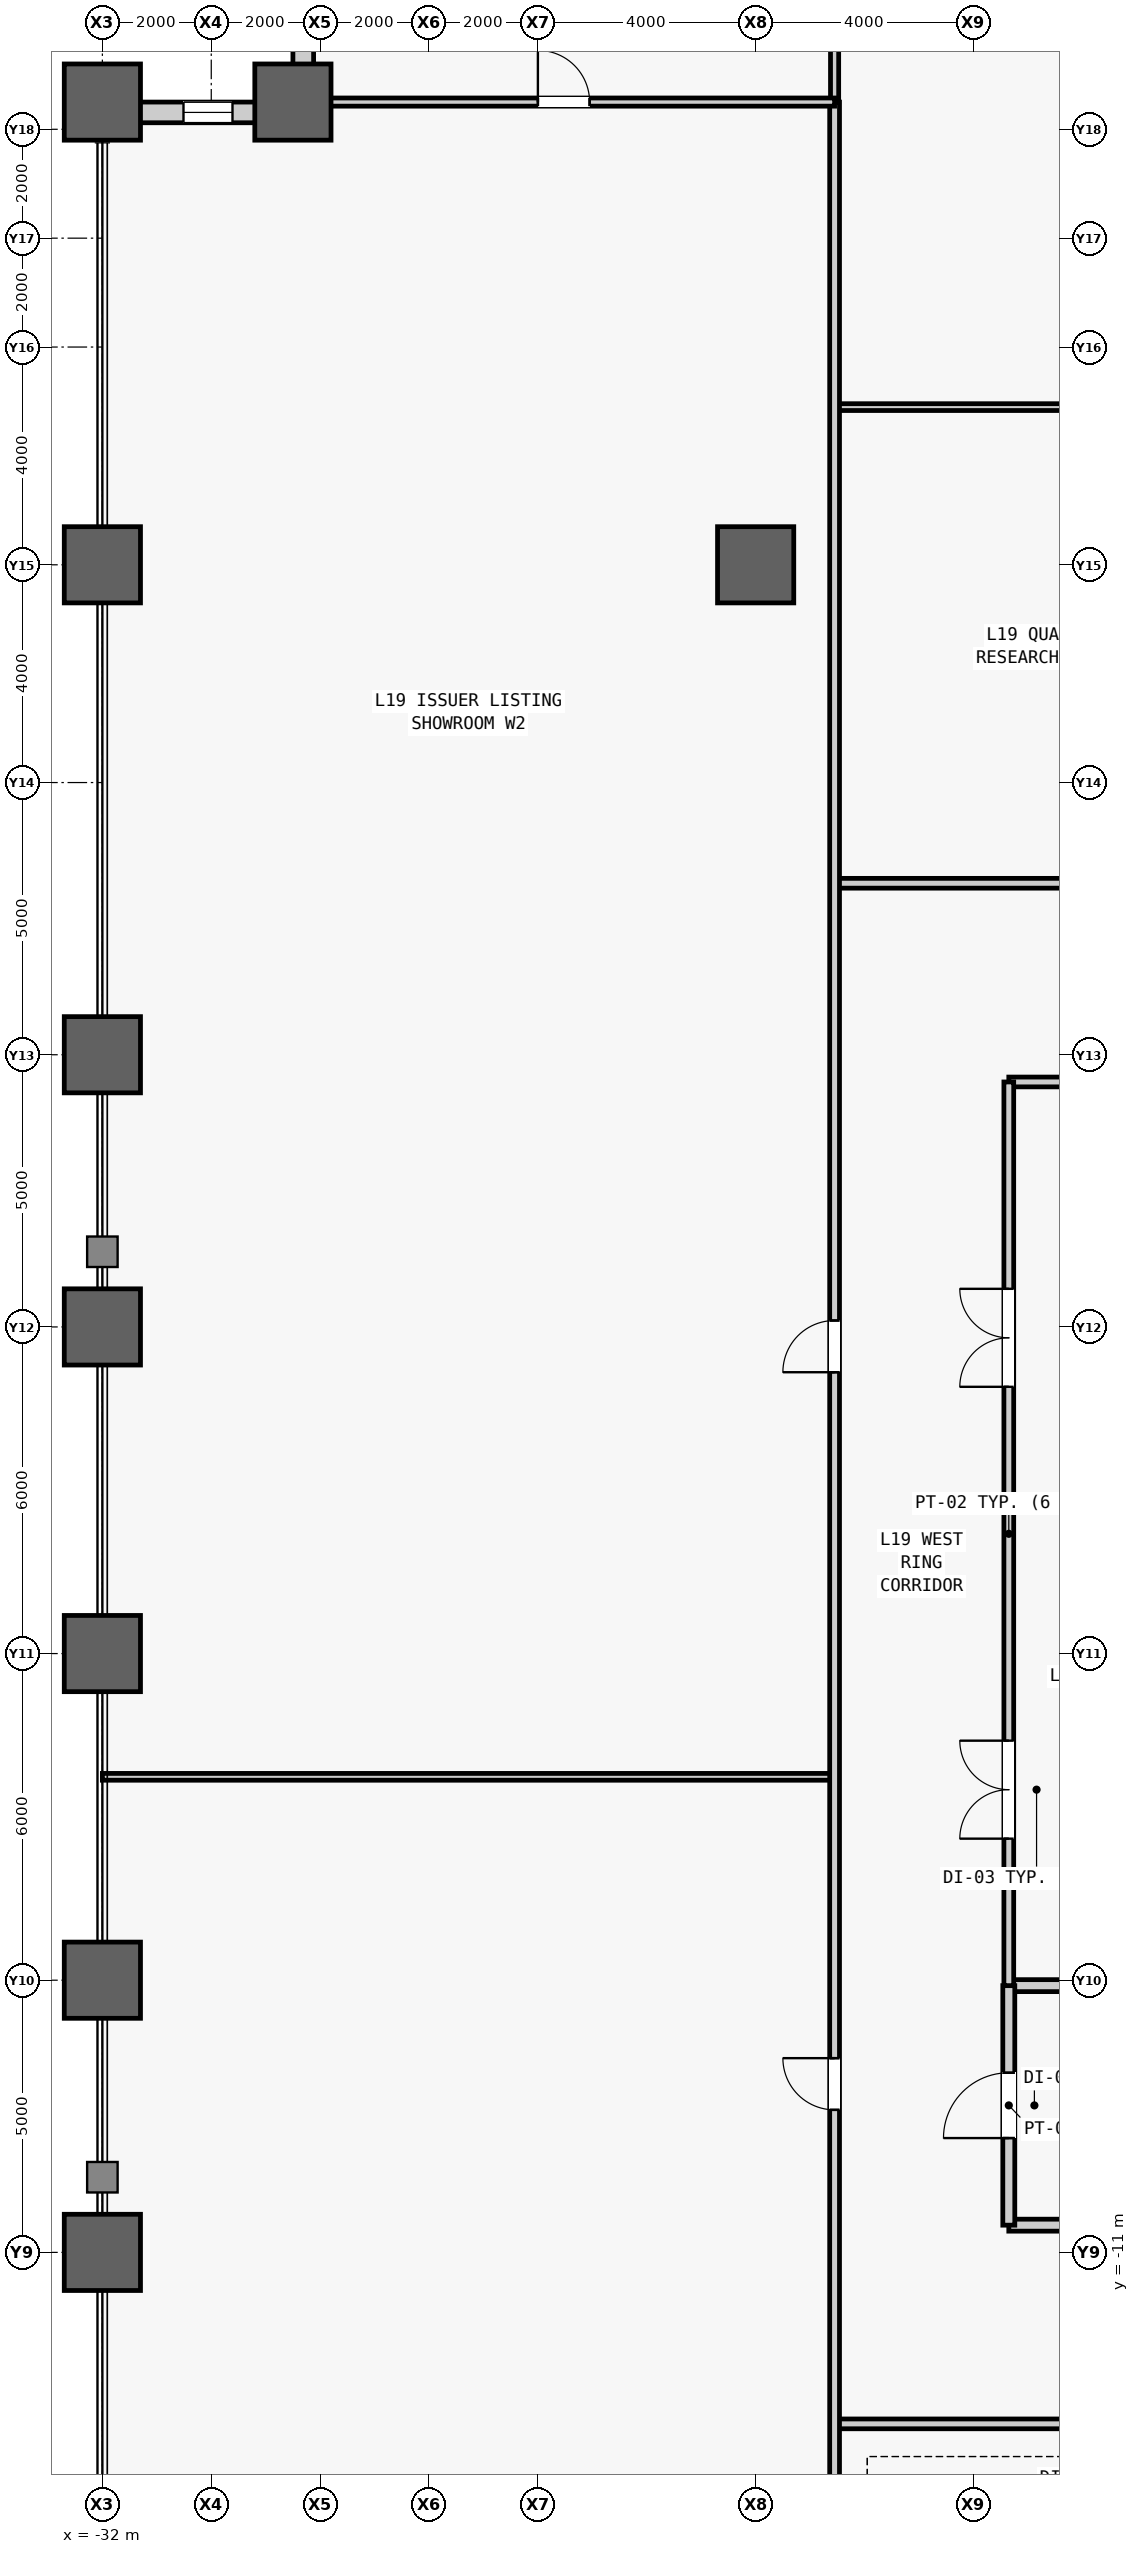
"""IFC4 building model, lengths in metres.
Left out: names, types, materials, properties, quantities, classifications, styles, units other than length and angle.
Written with IfcOpenShell. Run it as: python <this file> out.ifc"""

import sys

from ifc_helpers import new_model, si_unit, direction, frame, frame_2d, origin, origin_2d, place, context, subcontext, project, spatial, rectangle, hollow_rectangle, extrude, source, transform, mapped, element, fill, save


model = new_model("IFC4")
c1 = context("Model", 3, precision=1e-05, world=origin(), true_north=direction((0.0, 1.0)))
c2 = subcontext(c1, "Body", "Model", "MODEL_VIEW")
j1 = project(units=[si_unit("LENGTHUNIT", "METRE"), si_unit("PLANEANGLEUNIT", "RADIAN")], contexts=[c1])
p1 = place(None, origin())
s1 = spatial("IfcSite", under=j1, at=p1, CompositionType="ELEMENT")
p2 = place(p1, origin())
s2 = spatial("IfcBuilding", under=s1, at=p2, CompositionType="ELEMENT")
p3 = place(p2, frame((0.0, 0.0, 87.2)))
s3 = spatial("IfcBuildingStorey", under=s2, at=p3, CompositionType="ELEMENT", Elevation=87.2)
m1 = source(origin(), c2, "Body", "SweptSolid", [
    extrude(hollow_rectangle(XDim=1.4, YDim=1.4, WallThickness=0.075, at=origin_2d()), origin(), (0.0, 0.0, 1.0), 4.2),
])
for number, where, z_axis, x_axis in (
    (1, (-32.0, -11.0, 0.0), (0.0, 0.0, 1.0), (1.0, 0.0, 0.0)),
    (2, (-32.0, -6.0, 0.0), (0.0, 0.0, 1.0), (1.0, 0.0, 0.0)),
    (3, (-32.0, 0.0, 0.0), (0.0, 0.0, 1.0), (1.0, 0.0, 0.0)),
    (4, (-32.0, 6.0, 0.0), (0.0, 0.0, 1.0), (1.0, 0.0, 0.0)),
    (5, (-32.0, 11.0, 0.0), (0.0, 0.0, 1.0), (1.0, 0.0, 0.0)),
    (6, (-32.0, 20.0, 0.0), (0.0, 0.0, 1.0), (1.0, 0.0, 0.0)),
    (7, (-32.0, 28.5, 0.0), (0.0, 0.0, 1.0), (1.0, 0.0, 0.0)),
    (8, (-28.5, 28.5, 0.0), (0.0, 0.0, 1.0), (1.0, 0.0, 0.0)),
    (9, (-20.0, 20.0, 0.0), (0.0, 0.0, 1.0), (1.0, 0.0, 0.0)),
):
    element("IfcColumn", number, at=place(p3, frame(where, z_axis=z_axis, x_axis=x_axis)), inside=s3, PredefinedType="COLUMN", context=c2, shape_type="MappedRepresentation", body=[
        mapped(m1, transform((0.0, 0.0, 0.0), scale=1.0)),
    ])
m2 = source(origin(), c2, "Body", "SweptSolid", [
    extrude(rectangle(XDim=3.12, YDim=0.38, at=frame_2d((1.56, 0.0))), origin(), (0.0, 0.0, 1.0), 2.54),
])
p4 = place(p3, frame((-28.31, 28.5, 0.0), z_axis=(0.0, 0.0, 1.0), x_axis=(0.0, 1.0, 0.0)))
e10 = element("IfcWall", 10, at=p4, inside=s3, PredefinedType="STANDARD", context=c2, shape_type="MappedRepresentation", body=[
    mapped(m2, transform((0.0, 0.0, 0.0), scale=1.0)),
])
m3 = source(origin(), c2, "Body", "SweptSolid", [
    extrude(rectangle(XDim=0.9, YDim=1.82, at=frame_2d((0.45, 0.91))), frame((0.0, 0.2, 0.0), z_axis=(0.0, -1.0, 0.0), x_axis=(1.0, 0.0, 0.0)), (0.0, 0.0, 1.0), 0.4),
])
p5 = place(p4, frame((1.11, 0.0, 0.5)))
e11 = element("IfcOpeningElement", 11, at=p5, cuts=e10, PredefinedType="OPENING", context=c2, shape_type="MappedRepresentation", body=[
    mapped(m3, transform((0.0, 0.0, 0.0), scale=1.0)),
])
m4 = source(origin(), c2, "Body", "SweptSolid", [
    extrude(rectangle(XDim=3.12, YDim=0.38, at=frame_2d((1.56, 0.0))), origin(), (0.0, 0.0, 1.0), 3.245),
])
p6 = place(p3, frame((-28.5, 28.31, 0.0), z_axis=(0.0, 0.0, 1.0), x_axis=(-1.0, 0.0, 0.0)))
e12 = element("IfcWall", 12, at=p6, inside=s3, PredefinedType="STANDARD", context=c2, shape_type="MappedRepresentation", body=[
    mapped(m4, transform((0.0, 0.0, 0.0), scale=1.0)),
])
m5 = source(origin(), c2, "Body", "SweptSolid", [
    extrude(rectangle(XDim=0.9, YDim=2.4, at=frame_2d((0.45, 1.2))), frame((0.0, 0.2, 0.0), z_axis=(0.0, -1.0, 0.0), x_axis=(1.0, 0.0, 0.0)), (0.0, 0.0, 1.0), 0.4),
])
p7 = place(p6, frame((1.11, 0.0, 0.5)))
e13 = element("IfcOpeningElement", 13, at=p7, cuts=e12, PredefinedType="OPENING", context=c2, shape_type="MappedRepresentation", body=[
    mapped(m5, transform((0.0, 0.0, 0.0), scale=1.0)),
])
m6 = source(origin(), c2, "Body", "SweptSolid", [
    extrude(rectangle(XDim=4.05, YDim=0.22, at=frame_2d((2.025, 0.0))), origin(), (0.0, 0.0, 1.0), 3.94),
])
p8 = place(p3, frame((-15.35, -10.5, 0.0), z_axis=(0.0, 0.0, 1.0), x_axis=(1.0, 0.0, 0.0)))
e14 = element("IfcWall", 14, at=p8, inside=s3, PredefinedType="PARTITIONING", context=c2, shape_type="MappedRepresentation", body=[
    mapped(m6, transform((0.0, 0.0, 0.0), scale=1.0)),
])
m7 = source(origin(), c2, "Body", "SweptSolid", [
    extrude(rectangle(XDim=4.05, YDim=0.22, at=frame_2d((2.025, 0.0))), origin(), (0.0, 0.0, 1.0), 2.54),
])
p9 = place(p3, frame((-15.35, -6.1, 0.0), z_axis=(0.0, 0.0, 1.0), x_axis=(1.0, 0.0, 0.0)))
e15 = element("IfcWall", 15, at=p9, inside=s3, PredefinedType="PARTITIONING", context=c2, shape_type="MappedRepresentation", body=[
    mapped(m7, transform((0.0, 0.0, 0.0), scale=1.0)),
])
m8 = source(origin(), c2, "Body", "SweptSolid", [
    extrude(rectangle(XDim=4.4, YDim=0.22, at=frame_2d((2.2, 0.0))), origin(), (0.0, 0.0, 1.0), 3.94),
])
p10 = place(p3, frame((-15.35, -10.5, 0.0), z_axis=(0.0, 0.0, 1.0), x_axis=(0.0, 1.0, 0.0)))
e16 = element("IfcWall", 16, at=p10, inside=s3, PredefinedType="PARTITIONING", context=c2, shape_type="MappedRepresentation", body=[
    mapped(m8, transform((0.0, 0.0, 0.0), scale=1.0)),
])
m9 = source(origin(), c2, "Body", "SweptSolid", [
    extrude(rectangle(XDim=1.2, YDim=2.2, at=frame_2d((0.6, 1.1))), frame((0.0, 0.12, 0.0), z_axis=(0.0, -1.0, 0.0), x_axis=(1.0, 0.0, 0.0)), (0.0, 0.0, 1.0), 0.24),
])
p11 = place(p10, frame((1.6, 0.0, 0.0)))
e17 = element("IfcOpeningElement", 17, at=p11, cuts=e16, PredefinedType="OPENING", context=c2, shape_type="MappedRepresentation", body=[
    mapped(m9, transform((0.0, 0.0, 0.0), scale=1.0)),
])
m10 = source(origin(), c2, "Body", "SweptSolid", [
    extrude(rectangle(XDim=4.05, YDim=0.18, at=frame_2d((2.025, 0.0))), origin(), (0.0, 0.0, 1.0), 3.94),
])
p12 = place(p3, frame((-15.35, 10.5, 0.0), z_axis=(0.0, 0.0, 1.0), x_axis=(1.0, 0.0, 0.0)))
e18 = element("IfcWall", 18, at=p12, inside=s3, PredefinedType="PARTITIONING", context=c2, shape_type="MappedRepresentation", body=[
    mapped(m10, transform((0.0, 0.0, 0.0), scale=1.0)),
])
m11 = source(origin(), c2, "Body", "SweptSolid", [
    extrude(rectangle(XDim=16.6, YDim=0.18, at=frame_2d((8.3, 0.0))), origin(), (0.0, 0.0, 1.0), 3.94),
])
p13 = place(p3, frame((-15.35, -6.1, 0.0), z_axis=(0.0, 0.0, 1.0), x_axis=(0.0, 1.0, 0.0)))
e19 = element("IfcWall", 19, at=p13, inside=s3, PredefinedType="PARTITIONING", context=c2, shape_type="MappedRepresentation", body=[
    mapped(m11, transform((0.0, 0.0, 0.0), scale=1.0)),
])
m12 = source(origin(), c2, "Body", "SweptSolid", [
    extrude(rectangle(XDim=1.8, YDim=2.25, at=frame_2d((0.9, 1.125))), frame((0.0, 0.1, 0.0), z_axis=(0.0, -1.0, 0.0), x_axis=(1.0, 0.0, 0.0)), (0.0, 0.0, 1.0), 0.2),
])
p14 = place(p13, frame((2.7, 0.0, 0.0)))
e20 = element("IfcOpeningElement", 20, at=p14, cuts=e19, PredefinedType="OPENING", context=c2, shape_type="MappedRepresentation", body=[
    mapped(m12, transform((0.0, 0.0, 0.0), scale=1.0)),
])
p15 = place(p13, frame((11.0, 0.0, 0.0)))
e21 = element("IfcOpeningElement", 21, at=p15, cuts=e19, PredefinedType="OPENING", context=c2, shape_type="MappedRepresentation", body=[
    mapped(m12, transform((0.0, 0.0, 0.0), scale=1.0)),
])
m13 = source(origin(), c2, "Body", "SweptSolid", [
    extrude(rectangle(XDim=37.95, YDim=0.18, at=frame_2d((18.975, 0.0))), origin(), (0.0, 0.0, 1.0), 3.94),
])
p16 = place(p3, frame((-18.55, -14.15, 0.0), z_axis=(0.0, 0.0, 1.0), x_axis=(1.0, 0.0, 0.0)))
e22 = element("IfcWall", 22, at=p16, inside=s3, PredefinedType="PARTITIONING", context=c2, shape_type="MappedRepresentation", body=[
    mapped(m13, transform((0.0, 0.0, 0.0), scale=1.0)),
])
m14 = source(origin(), c2, "Body", "SweptSolid", [
    extrude(rectangle(XDim=1.05, YDim=2.2, at=frame_2d((0.525, 1.1))), frame((0.0, 0.1, 0.0), z_axis=(0.0, -1.0, 0.0), x_axis=(1.0, 0.0, 0.0)), (0.0, 0.0, 1.0), 0.2),
])
p17 = place(p16, frame((4.966, 0.0, 0.0)))
e23 = element("IfcOpeningElement", 23, at=p17, cuts=e22, PredefinedType="OPENING", context=c2, shape_type="MappedRepresentation", body=[
    mapped(m14, transform((0.0, 0.0, 0.0), scale=1.0)),
])
p18 = place(p16, frame((10.291, 0.0, 0.0)))
e24 = element("IfcOpeningElement", 24, at=p18, cuts=e22, PredefinedType="OPENING", context=c2, shape_type="MappedRepresentation", body=[
    mapped(m14, transform((0.0, 0.0, 0.0), scale=1.0)),
])
p19 = place(p16, frame((18.64, 0.0, 0.0)))
e25 = element("IfcOpeningElement", 25, at=p19, cuts=e22, PredefinedType="OPENING", context=c2, shape_type="MappedRepresentation", body=[
    mapped(m14, transform((0.0, 0.0, 0.0), scale=1.0)),
])
p20 = place(p16, frame((27.178, 0.0, 0.0)))
e26 = element("IfcOpeningElement", 26, at=p20, cuts=e22, PredefinedType="OPENING", context=c2, shape_type="MappedRepresentation", body=[
    mapped(m14, transform((0.0, 0.0, 0.0), scale=1.0)),
])
m15 = source(origin(), c2, "Body", "SweptSolid", [
    extrude(rectangle(XDim=11.385, YDim=0.125, at=frame_2d((5.692, 0.0))), origin(), (0.0, 0.0, 1.0), 3.94),
])
p21 = place(p3, frame((-18.55, 22.896, 0.0), z_axis=(0.0, 0.0, 1.0), x_axis=(1.0, 0.0, 0.0)))
e27 = element("IfcWall", 27, at=p21, inside=s3, PredefinedType="PARTITIONING", context=c2, shape_type="MappedRepresentation", body=[
    mapped(m15, transform((0.0, 0.0, 0.0), scale=1.0)),
])
m16 = source(origin(), c2, "Body", "SweptSolid", [
    extrude(rectangle(XDim=0.95, YDim=2.15, at=frame_2d((0.475, 1.075))), frame((0.0, 0.073, 0.0), z_axis=(0.0, -1.0, 0.0), x_axis=(1.0, 0.0, 0.0)), (0.0, 0.0, 1.0), 0.145),
])
p22 = place(p21, frame((5.218, 0.0, 0.0)))
e28 = element("IfcOpeningElement", 28, at=p22, cuts=e27, PredefinedType="OPENING", context=c2, shape_type="MappedRepresentation", body=[
    mapped(m16, transform((0.0, 0.0, 0.0), scale=1.0)),
])
p23 = place(p3, frame((-18.55, 14.15, 0.0), z_axis=(0.0, 0.0, 1.0), x_axis=(1.0, 0.0, 0.0)))
e29 = element("IfcWall", 29, at=p23, inside=s3, PredefinedType="PARTITIONING", context=c2, shape_type="MappedRepresentation", body=[
    mapped(m13, transform((0.0, 0.0, 0.0), scale=1.0)),
])
p24 = place(p23, frame((7.242, 0.0, 0.0)))
e30 = element("IfcOpeningElement", 30, at=p24, cuts=e29, PredefinedType="OPENING", context=c2, shape_type="MappedRepresentation", body=[
    mapped(m14, transform((0.0, 0.0, 0.0), scale=1.0)),
])
p25 = place(p23, frame((17.691, 0.0, 0.0)))
e31 = element("IfcOpeningElement", 31, at=p25, cuts=e29, PredefinedType="OPENING", context=c2, shape_type="MappedRepresentation", body=[
    mapped(m14, transform((0.0, 0.0, 0.0), scale=1.0)),
])
p26 = place(p23, frame((28.473, 0.0, 0.0)))
e32 = element("IfcOpeningElement", 32, at=p26, cuts=e29, PredefinedType="OPENING", context=c2, shape_type="MappedRepresentation", body=[
    mapped(m14, transform((0.0, 0.0, 0.0), scale=1.0)),
])
m17 = source(origin(), c2, "Body", "SweptSolid", [
    extrude(rectangle(XDim=3.5, YDim=0.15, at=frame_2d((1.75, 0.0))), origin(), (0.0, 0.0, 1.0), 3.94),
])
p27 = place(p3, frame((-18.55, 28.5, 0.0), z_axis=(0.0, 0.0, 1.0), x_axis=(0.0, 1.0, 0.0)))
e33 = element("IfcWall", 33, at=p27, inside=s3, PredefinedType="PARTITIONING", context=c2, shape_type="MappedRepresentation", body=[
    mapped(m17, transform((0.0, 0.0, 0.0), scale=1.0)),
])
m18 = source(origin(), c2, "Body", "SweptSolid", [
    extrude(rectangle(XDim=13.45, YDim=0.125, at=frame_2d((6.725, 0.0))), origin(), (0.0, 0.0, 1.0), 3.94),
])
p28 = place(p3, frame((-32.0, -2.264, 0.0), z_axis=(0.0, 0.0, 1.0), x_axis=(1.0, 0.0, 0.0)))
e34 = element("IfcWall", 34, at=p28, inside=s3, PredefinedType="PARTITIONING", context=c2, shape_type="MappedRepresentation", body=[
    mapped(m18, transform((0.0, 0.0, 0.0), scale=1.0)),
])
m19 = source(origin(), c2, "Body", "SweptSolid", [
    extrude(rectangle(XDim=57.0, YDim=0.18, at=frame_2d((28.5, 0.0))), origin(), (0.0, 0.0, 1.0), 3.94),
])
p29 = place(p3, frame((-18.55, -28.5, 0.0), z_axis=(0.0, 0.0, 1.0), x_axis=(0.0, 1.0, 0.0)))
e35 = element("IfcWall", 35, at=p29, inside=s3, PredefinedType="PARTITIONING", context=c2, shape_type="MappedRepresentation", body=[
    mapped(m19, transform((0.0, 0.0, 0.0), scale=1.0)),
])
m20 = source(origin(), c2, "Body", "SweptSolid", [
    extrude(rectangle(XDim=0.95, YDim=2.15, at=frame_2d((0.475, 1.075))), frame((0.0, 0.1, 0.0), z_axis=(0.0, -1.0, 0.0), x_axis=(1.0, 0.0, 0.0)), (0.0, 0.0, 1.0), 0.2),
])
p30 = place(p29, frame((20.118, 0.0, 0.0)))
e36 = element("IfcOpeningElement", 36, at=p30, cuts=e35, PredefinedType="OPENING", context=c2, shape_type="MappedRepresentation", body=[
    mapped(m20, transform((0.0, 0.0, 0.0), scale=1.0)),
])
p31 = place(p29, frame((33.668, 0.0, 0.0)))
e37 = element("IfcOpeningElement", 37, at=p31, cuts=e35, PredefinedType="OPENING", context=c2, shape_type="MappedRepresentation", body=[
    mapped(m20, transform((0.0, 0.0, 0.0), scale=1.0)),
])
m21 = source(origin(), c2, "Body", "SweptSolid", [
    extrude(rectangle(XDim=9.95, YDim=0.15, at=frame_2d((4.975, 0.0))), origin(), (0.0, 0.0, 1.0), 3.94),
])
p32 = place(p3, frame((-28.5, 28.5, 0.0), z_axis=(0.0, 0.0, 1.0), x_axis=(1.0, 0.0, 0.0)))
e38 = element("IfcWall", 38, at=p32, inside=s3, PredefinedType="PARTITIONING", context=c2, shape_type="MappedRepresentation", body=[
    mapped(m21, transform((0.0, 0.0, 0.0), scale=1.0)),
])
m22 = source(origin(), c2, "Body", "SweptSolid", [
    extrude(rectangle(XDim=0.95, YDim=2.15, at=frame_2d((0.475, 1.075))), frame((0.0, 0.085, 0.0), z_axis=(0.0, -1.0, 0.0), x_axis=(1.0, 0.0, 0.0)), (0.0, 0.0, 1.0), 0.17),
])
p33 = place(p32, frame((4.5, 0.0, 0.0)))
e39 = element("IfcOpeningElement", 39, at=p33, cuts=e38, PredefinedType="OPENING", context=c2, shape_type="MappedRepresentation", body=[
    mapped(m22, transform((0.0, 0.0, 0.0), scale=1.0)),
])
m23 = source(origin(), c2, "Body", "SweptSolid", [
    extrude(rectangle(XDim=0.9, YDim=2.4, at=frame_2d((0.45, 1.2))), frame((0.0, 0.03, 0.0), z_axis=(0.0, -1.0, 0.0), x_axis=(1.0, 0.0, 0.0)), (0.0, 0.0, 1.0), 0.06),
])
p34 = place(p7, origin())
e40 = element("IfcWindow", 40, at=p34, inside=s3, PartitioningType="SINGLE_PANEL", PredefinedType="WINDOW", context=c2, shape_type="MappedRepresentation", body=[
    mapped(m23, transform((0.0, 0.0, 0.0), scale=1.0)),
])
fill(e13, e40)
m24 = source(origin(), c2, "Body", "SweptSolid", [
    extrude(rectangle(XDim=1.2, YDim=2.2, at=frame_2d((0.6, 1.1))), frame((0.0, 0.025, 0.0), z_axis=(0.0, -1.0, 0.0), x_axis=(1.0, 0.0, 0.0)), (0.0, 0.0, 1.0), 0.05),
])
p35 = place(p11, origin())
e41 = element("IfcDoor", 41, at=p35, inside=s3, OperationType="SINGLE_SWING_LEFT", PredefinedType="DOOR", context=c2, shape_type="MappedRepresentation", body=[
    mapped(m24, transform((0.0, 0.0, 0.0), scale=1.0)),
])
fill(e17, e41)
m25 = source(origin(), c2, "Body", "SweptSolid", [
    extrude(rectangle(XDim=1.8, YDim=2.25, at=frame_2d((0.9, 1.125))), frame((0.0, 0.025, 0.0), z_axis=(0.0, -1.0, 0.0), x_axis=(1.0, 0.0, 0.0)), (0.0, 0.0, 1.0), 0.05),
])
p36 = place(p14, origin())
e42 = element("IfcDoor", 42, at=p36, inside=s3, OperationType="SINGLE_SWING_LEFT", PredefinedType="DOOR", context=c2, shape_type="MappedRepresentation", body=[
    mapped(m25, transform((0.0, 0.0, 0.0), scale=1.0)),
])
fill(e20, e42)
p37 = place(p15, origin())
e43 = element("IfcDoor", 43, at=p37, inside=s3, OperationType="SINGLE_SWING_RIGHT", PredefinedType="DOOR", context=c2, shape_type="MappedRepresentation", body=[
    mapped(m25, transform((0.0, 0.0, 0.0), scale=1.0)),
])
fill(e21, e43)
m26 = source(origin(), c2, "Body", "SweptSolid", [
    extrude(rectangle(XDim=0.95, YDim=2.15, at=frame_2d((0.475, 1.075))), frame((0.0, 0.025, 0.0), z_axis=(0.0, -1.0, 0.0), x_axis=(1.0, 0.0, 0.0)), (0.0, 0.0, 1.0), 0.05),
])
p38 = place(p30, origin())
e44 = element("IfcDoor", 44, at=p38, inside=s3, OperationType="SINGLE_SWING_RIGHT", PredefinedType="DOOR", context=c2, shape_type="MappedRepresentation", body=[
    mapped(m26, transform((0.0, 0.0, 0.0), scale=1.0)),
])
fill(e36, e44)
p39 = place(p31, origin())
e45 = element("IfcDoor", 45, at=p39, inside=s3, OperationType="SINGLE_SWING_LEFT", PredefinedType="DOOR", context=c2, shape_type="MappedRepresentation", body=[
    mapped(m26, transform((0.0, 0.0, 0.0), scale=1.0)),
])
fill(e37, e45)
p40 = place(p33, origin())
e46 = element("IfcDoor", 46, at=p40, inside=s3, OperationType="SINGLE_SWING_LEFT", PredefinedType="DOOR", context=c2, shape_type="MappedRepresentation", body=[
    mapped(m26, transform((0.0, 0.0, 0.0), scale=1.0)),
])
fill(e39, e46)
save(model, sys.argv[1])
